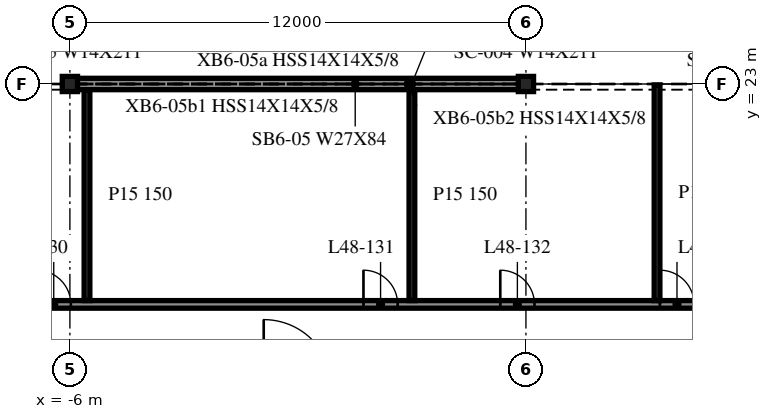
"""IFC4 building model, lengths in metres.
Left out: names, types, materials, properties, quantities, classifications, styles, units other than length and angle.
Written with IfcOpenShell. Run it as: python <this file> out.ifc"""

import sys

from ifc_helpers import new_model, si_unit, direction, frame, frame_2d, origin, origin_2d, place, context, subcontext, project, spatial, rectangle, i_section, extrude, element, fill, save


model = new_model("IFC4")
c1 = context("Model", 3, precision=1e-05, world=origin(), true_north=direction((0.0, 1.0)))
c2 = subcontext(c1, "Body", "Model", "MODEL_VIEW")
j1 = project(units=[si_unit("LENGTHUNIT", "METRE"), si_unit("PLANEANGLEUNIT", "RADIAN")], contexts=[c1])
p1 = place(None, origin())
s1 = spatial("IfcSite", under=j1, at=p1, CompositionType="ELEMENT")
p2 = place(p1, origin())
s2 = spatial("IfcBuilding", under=s1, at=p2, CompositionType="ELEMENT")
p3 = place(p2, frame((0.0, 0.0, 201.5)))
s3 = spatial("IfcBuildingStorey", under=s2, at=p3, CompositionType="ELEMENT", Elevation=201.5)
for number, where, z_axis, x_axis in (
    (1, (6.0, 23.0, -0.34), (0.0, 0.0, 1.0), (1.0, 0.0, 0.0)),
    (2, (-6.0, 23.0, -0.34), (0.0, 0.0, 1.0), (1.0, 0.0, 0.0)),
):
    element("IfcColumn", number, at=place(p3, frame(where, z_axis=z_axis, x_axis=x_axis)), inside=s3, PredefinedType="COLUMN", context=c2, shape_type="SweptSolid", body=[
        extrude(i_section(OverallWidth=0.401, OverallDepth=0.399, WebThickness=0.025, FlangeThickness=0.04, at=origin_2d()), origin(), (0.0, 0.0, 1.0), 3.8),
    ])
p4 = place(p3, frame((5.988, 23.0, 0.0), z_axis=(0.0, 0.0, 1.0), x_axis=(-1.0, 0.0, 0.0)))
e3 = element("IfcWall", 3, at=p4, inside=s3, PredefinedType="NOTDEFINED", context=c2, shape_type="SweptSolid", body=[
    extrude(rectangle(XDim=11.975, YDim=0.3, at=frame_2d((5.988, 0.0))), origin(), (0.0, 0.0, 1.0), 2.782),
])
p5 = place(p3, frame((-41.975, 17.2, 0.0), z_axis=(0.0, 0.0, 1.0), x_axis=(1.0, 0.0, 0.0)))
e4 = element("IfcWall", 4, at=p5, inside=s3, PredefinedType="PARTITIONING", context=c2, shape_type="SweptSolid", body=[
    extrude(rectangle(XDim=95.782, YDim=0.2, at=frame_2d((47.891, 0.0))), origin(), (0.0, 0.0, 1.0), 3.46),
])
p6 = place(p5, frame((7.7, 0.0, 0.0)))
e5 = element("IfcOpeningElement", 5, at=p6, cuts=e4, PredefinedType="OPENING", context=c2, shape_type="SweptSolid", body=[
    extrude(rectangle(XDim=0.9, YDim=2.1, at=frame_2d((0.45, 1.05))), frame((0.0, 0.11, 0.0), z_axis=(0.0, -1.0, 0.0), x_axis=(1.0, 0.0, 0.0)), (0.0, 0.0, 1.0), 0.22),
])
p7 = place(p5, frame((13.7, 0.0, 0.0)))
e6 = element("IfcOpeningElement", 6, at=p7, cuts=e4, PredefinedType="OPENING", context=c2, shape_type="SweptSolid", body=[
    extrude(rectangle(XDim=0.9, YDim=2.1, at=frame_2d((0.45, 1.05))), frame((0.0, 0.11, 0.0), z_axis=(0.0, -1.0, 0.0), x_axis=(1.0, 0.0, 0.0)), (0.0, 0.0, 1.0), 0.22),
])
p8 = place(p5, frame((19.7, 0.0, 0.0)))
e7 = element("IfcOpeningElement", 7, at=p8, cuts=e4, PredefinedType="OPENING", context=c2, shape_type="SweptSolid", body=[
    extrude(rectangle(XDim=0.9, YDim=2.1, at=frame_2d((0.45, 1.05))), frame((0.0, 0.11, 0.0), z_axis=(0.0, -1.0, 0.0), x_axis=(1.0, 0.0, 0.0)), (0.0, 0.0, 1.0), 0.22),
])
p9 = place(p5, frame((31.7, 0.0, 0.0)))
e8 = element("IfcOpeningElement", 8, at=p9, cuts=e4, PredefinedType="OPENING", context=c2, shape_type="SweptSolid", body=[
    extrude(rectangle(XDim=0.9, YDim=2.1, at=frame_2d((0.45, 1.05))), frame((0.0, 0.11, 0.0), z_axis=(0.0, -1.0, 0.0), x_axis=(1.0, 0.0, 0.0)), (0.0, 0.0, 1.0), 0.22),
])
p10 = place(p5, frame((35.1, 0.0, 0.0)))
e9 = element("IfcOpeningElement", 9, at=p10, cuts=e4, PredefinedType="OPENING", context=c2, shape_type="SweptSolid", body=[
    extrude(rectangle(XDim=0.9, YDim=2.1, at=frame_2d((0.45, 1.05))), frame((0.0, 0.11, 0.0), z_axis=(0.0, -1.0, 0.0), x_axis=(1.0, 0.0, 0.0)), (0.0, 0.0, 1.0), 0.22),
])
p11 = place(p5, frame((43.7, 0.0, 0.0)))
e10 = element("IfcOpeningElement", 10, at=p11, cuts=e4, PredefinedType="OPENING", context=c2, shape_type="SweptSolid", body=[
    extrude(rectangle(XDim=0.9, YDim=2.1, at=frame_2d((0.45, 1.05))), frame((0.0, 0.11, 0.0), z_axis=(0.0, -1.0, 0.0), x_axis=(1.0, 0.0, 0.0)), (0.0, 0.0, 1.0), 0.22),
])
p12 = place(p5, frame((47.3, 0.0, 0.0)))
e11 = element("IfcOpeningElement", 11, at=p12, cuts=e4, PredefinedType="OPENING", context=c2, shape_type="SweptSolid", body=[
    extrude(rectangle(XDim=0.9, YDim=2.1, at=frame_2d((0.45, 1.05))), frame((0.0, 0.11, 0.0), z_axis=(0.0, -1.0, 0.0), x_axis=(1.0, 0.0, 0.0)), (0.0, 0.0, 1.0), 0.22),
])
p13 = place(p5, frame((51.5, 0.0, 0.0)))
e12 = element("IfcOpeningElement", 12, at=p13, cuts=e4, PredefinedType="OPENING", context=c2, shape_type="SweptSolid", body=[
    extrude(rectangle(XDim=0.9, YDim=2.1, at=frame_2d((0.45, 1.05))), frame((0.0, 0.11, 0.0), z_axis=(0.0, -1.0, 0.0), x_axis=(1.0, 0.0, 0.0)), (0.0, 0.0, 1.0), 0.22),
])
p14 = place(p5, frame((57.1, 0.0, 0.0)))
e13 = element("IfcOpeningElement", 13, at=p14, cuts=e4, PredefinedType="OPENING", context=c2, shape_type="SweptSolid", body=[
    extrude(rectangle(XDim=0.9, YDim=2.1, at=frame_2d((0.45, 1.05))), frame((0.0, 0.11, 0.0), z_axis=(0.0, -1.0, 0.0), x_axis=(1.0, 0.0, 0.0)), (0.0, 0.0, 1.0), 0.22),
])
p15 = place(p5, frame((69.1, 0.0, 0.0)))
e14 = element("IfcOpeningElement", 14, at=p15, cuts=e4, PredefinedType="OPENING", context=c2, shape_type="SweptSolid", body=[
    extrude(rectangle(XDim=0.9, YDim=2.1, at=frame_2d((0.45, 1.05))), frame((0.0, 0.11, 0.0), z_axis=(0.0, -1.0, 0.0), x_axis=(1.0, 0.0, 0.0)), (0.0, 0.0, 1.0), 0.22),
])
p16 = place(p5, frame((72.5, 0.0, 0.0)))
e15 = element("IfcOpeningElement", 15, at=p16, cuts=e4, PredefinedType="OPENING", context=c2, shape_type="SweptSolid", body=[
    extrude(rectangle(XDim=0.9, YDim=2.1, at=frame_2d((0.45, 1.05))), frame((0.0, 0.11, 0.0), z_axis=(0.0, -1.0, 0.0), x_axis=(1.0, 0.0, 0.0)), (0.0, 0.0, 1.0), 0.22),
])
p17 = place(p5, frame((81.1, 0.0, 0.0)))
e16 = element("IfcOpeningElement", 16, at=p17, cuts=e4, PredefinedType="OPENING", context=c2, shape_type="SweptSolid", body=[
    extrude(rectangle(XDim=0.9, YDim=2.1, at=frame_2d((0.45, 1.05))), frame((0.0, 0.11, 0.0), z_axis=(0.0, -1.0, 0.0), x_axis=(1.0, 0.0, 0.0)), (0.0, 0.0, 1.0), 0.22),
])
p18 = place(p5, frame((87.1, 0.0, 0.0)))
e17 = element("IfcOpeningElement", 17, at=p18, cuts=e4, PredefinedType="OPENING", context=c2, shape_type="SweptSolid", body=[
    extrude(rectangle(XDim=0.9, YDim=2.1, at=frame_2d((0.45, 1.05))), frame((0.0, 0.11, 0.0), z_axis=(0.0, -1.0, 0.0), x_axis=(1.0, 0.0, 0.0)), (0.0, 0.0, 1.0), 0.22),
])
for number, where, z_axis, x_axis in (
    (18, (-5.55, 17.3, 0.0), (0.0, 0.0, 1.0), (0.0, 1.0, 0.0)),
    (19, (3.0, 17.3, 0.0), (0.0, 0.0, 1.0), (0.0, 1.0, 0.0)),
):
    element("IfcWall", number, at=place(p3, frame(where, z_axis=z_axis, x_axis=x_axis)), inside=s3, PredefinedType="PARTITIONING", context=c2, shape_type="SweptSolid", body=[
        extrude(rectangle(XDim=5.55, YDim=0.15, at=frame_2d((2.775, 0.0))), origin(), (0.0, 0.0, 1.0), 3.46),
    ])
p19 = place(p3, frame((9.45, 17.3, 0.0), z_axis=(0.0, 0.0, 1.0), x_axis=(0.0, 1.0, 0.0)))
e20 = element("IfcWall", 20, at=p19, inside=s3, PredefinedType="PARTITIONING", context=c2, shape_type="SweptSolid", body=[
    extrude(rectangle(XDim=5.675, YDim=0.15, at=frame_2d((2.837, 0.0))), origin(), (0.0, 0.0, 1.0), 3.46),
])
p20 = place(p10, origin())
e21 = element("IfcDoor", 21, at=p20, inside=s3, OperationType="SINGLE_SWING_LEFT", PredefinedType="DOOR", context=c2, shape_type="SweptSolid", body=[
    extrude(rectangle(XDim=0.9, YDim=2.1, at=frame_2d((0.45, 1.05))), frame((0.0, 0.025, 0.0), z_axis=(0.0, -1.0, 0.0), x_axis=(1.0, 0.0, 0.0)), (0.0, 0.0, 1.0), 0.05),
])
fill(e9, e21)
p21 = place(p11, origin())
e22 = element("IfcDoor", 22, at=p21, inside=s3, OperationType="SINGLE_SWING_LEFT", PredefinedType="DOOR", context=c2, shape_type="SweptSolid", body=[
    extrude(rectangle(XDim=0.9, YDim=2.1, at=frame_2d((0.45, 1.05))), frame((0.0, 0.025, 0.0), z_axis=(0.0, -1.0, 0.0), x_axis=(1.0, 0.0, 0.0)), (0.0, 0.0, 1.0), 0.05),
])
fill(e10, e22)
p22 = place(p12, origin())
e23 = element("IfcDoor", 23, at=p22, inside=s3, OperationType="SINGLE_SWING_LEFT", PredefinedType="DOOR", context=c2, shape_type="SweptSolid", body=[
    extrude(rectangle(XDim=0.9, YDim=2.1, at=frame_2d((0.45, 1.05))), frame((0.0, 0.025, 0.0), z_axis=(0.0, -1.0, 0.0), x_axis=(1.0, 0.0, 0.0)), (0.0, 0.0, 1.0), 0.05),
])
fill(e11, e23)
p23 = place(p13, origin())
e24 = element("IfcDoor", 24, at=p23, inside=s3, OperationType="SINGLE_SWING_RIGHT", PredefinedType="DOOR", context=c2, shape_type="SweptSolid", body=[
    extrude(rectangle(XDim=0.9, YDim=2.1, at=frame_2d((0.45, 1.05))), frame((0.0, 0.025, 0.0), z_axis=(0.0, -1.0, 0.0), x_axis=(1.0, 0.0, 0.0)), (0.0, 0.0, 1.0), 0.05),
])
fill(e12, e24)
save(model, sys.argv[1])
